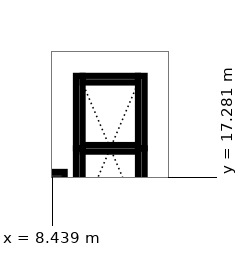
"""IFC4 building model, lengths in metres.
Left out: names, types, materials, properties, quantities, classifications, styles, units other than length and angle.
Written with IfcOpenShell. Run it as: python <this file> out.ifc"""

import sys

from ifc_helpers import new_model, si_unit, direction, frame, frame_2d, origin, origin_2d, place, context, subcontext, project, spatial, rectangle, extrude, source, transform, mapped, element, save


model = new_model("IFC4")
c1 = context("Model", 3, precision=1e-05, world=origin(), true_north=direction((0.0, 1.0)))
c2 = subcontext(c1, "Body", "Model", "MODEL_VIEW")
j1 = project(units=[si_unit("LENGTHUNIT", "METRE"), si_unit("PLANEANGLEUNIT", "RADIAN")], contexts=[c1])
p1 = place(None, origin())
s1 = spatial("IfcSite", under=j1, at=p1, CompositionType="ELEMENT")
p2 = place(p1, origin())
s2 = spatial("IfcBuilding", under=s1, at=p2, CompositionType="ELEMENT")
p3 = place(p2, frame((0.0, 0.0, 319.55)))
s3 = spatial("IfcBuildingStorey", under=s2, at=p3, CompositionType="ELEMENT", Elevation=319.55)
m1 = source(origin(), c2, "Body", "SweptSolid", [
    extrude(rectangle(XDim=0.9, YDim=0.9, at=origin_2d()), origin(), (0.0, 0.0, 1.0), 3.755),
])
p4 = place(p3, frame((8.4, 17.0, 0.0), z_axis=(0.0, 0.0, 1.0), x_axis=(1.0, 0.0, 0.0)))
e1 = element("IfcColumn", 1, at=p4, inside=s3, PredefinedType="COLUMN", context=c2, shape_type="MappedRepresentation", body=[
    mapped(m1, transform((0.0, 0.0, 0.0), scale=1.0)),
])
m2 = source(origin(), c2, "Body", "SweptSolid", [
    extrude(rectangle(XDim=2.385, YDim=0.22, at=frame_2d((1.192, 0.0))), origin(), (0.0, 0.0, 1.0), 3.5),
])
for number, where, z_axis, x_axis in (
    (2, (9.33, 15.84, 0.0), (0.0, 0.0, 1.0), (0.0, 1.0, 0.0)),
    (3, (11.37, 15.84, 0.0), (0.0, 0.0, 1.0), (0.0, 1.0, 0.0)),
):
    element("IfcWall", number, at=place(p3, frame(where, z_axis=z_axis, x_axis=x_axis)), inside=s3, PredefinedType="SHEAR", context=c2, shape_type="MappedRepresentation", body=[
        mapped(m2, transform((0.0, 0.0, 0.0), scale=1.0)),
    ])
m3 = source(origin(), c2, "Body", "SweptSolid", [
    extrude(rectangle(XDim=1.82, YDim=0.22, at=frame_2d((0.91, 0.0))), origin(), (0.0, 0.0, 1.0), 3.8),
])
p5 = place(p3, frame((9.44, 18.225, 0.0), z_axis=(0.0, 0.0, 1.0), x_axis=(1.0, 0.0, 0.0)))
e4 = element("IfcWall", 4, at=p5, inside=s3, PredefinedType="SHEAR", context=c2, shape_type="MappedRepresentation", body=[
    mapped(m3, transform((0.0, 0.0, 0.0), scale=1.0)),
])
for number, where, z_axis, x_axis in (
    (5, (9.33, 18.225, 0.0), (0.0, 0.0, 1.0), (0.0, 1.0, 0.0)),
    (6, (11.37, 18.225, 0.0), (0.0, 0.0, 1.0), (0.0, 1.0, 0.0)),
):
    element("IfcWall", number, at=place(p3, frame(where, z_axis=z_axis, x_axis=x_axis)), inside=s3, PredefinedType="SHEAR", context=c2, shape_type="MappedRepresentation", body=[
        mapped(m2, transform((0.0, 0.0, 0.0), scale=1.0)),
    ])
m4 = source(origin(), c2, "Body", "SweptSolid", [
    extrude(rectangle(XDim=1.82, YDim=0.22, at=frame_2d((0.91, 0.0))), origin(), (0.0, 0.0, 1.0), 3.5),
])
p6 = place(p3, frame((9.44, 20.5, 0.0), z_axis=(0.0, 0.0, 1.0), x_axis=(1.0, 0.0, 0.0)))
e7 = element("IfcWall", 7, at=p6, inside=s3, PredefinedType="SHEAR", context=c2, shape_type="MappedRepresentation", body=[
    mapped(m4, transform((0.0, 0.0, 0.0), scale=1.0)),
])
save(model, sys.argv[1])
